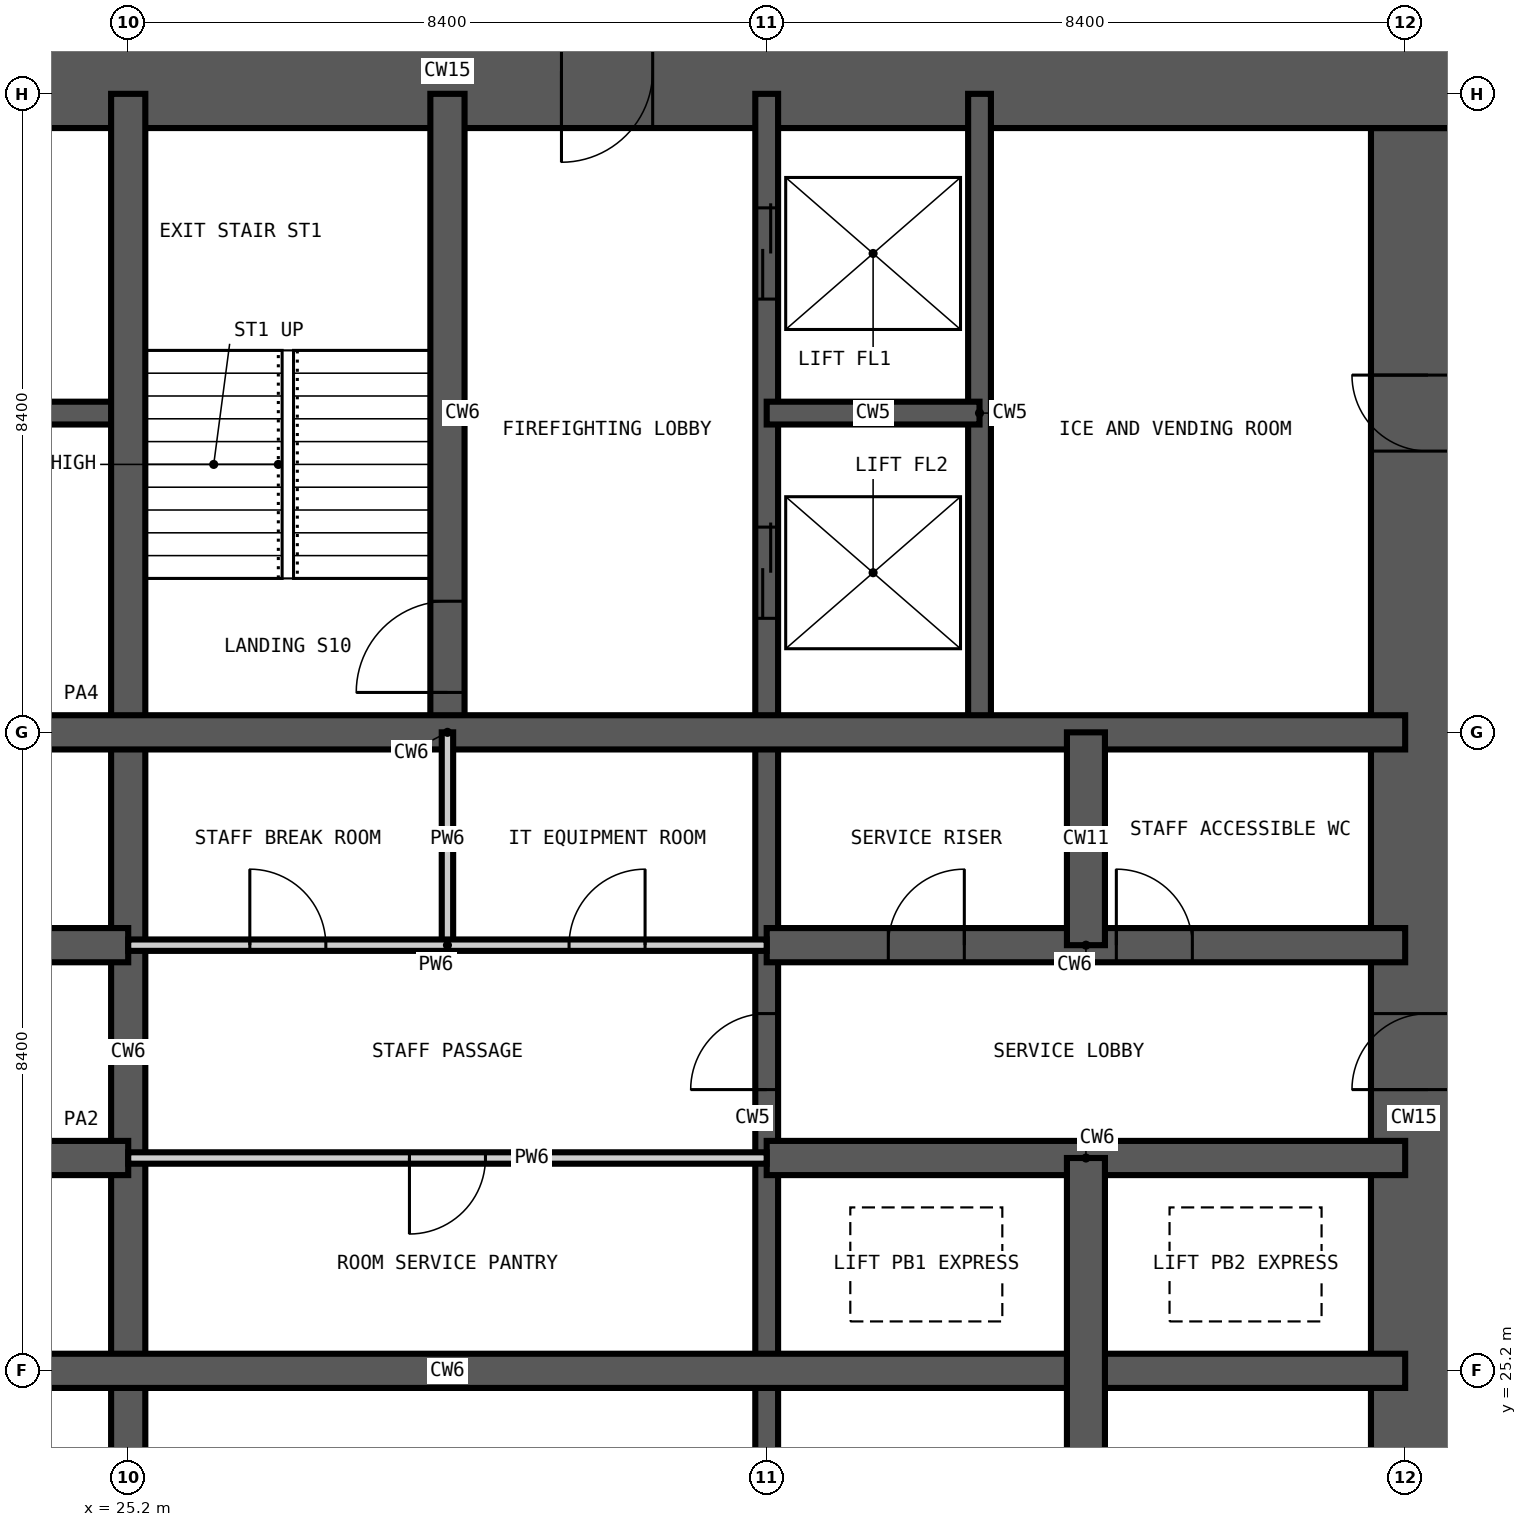
"""IFC4 building model, lengths in metres.
Left out: names, types, materials, properties, quantities, classifications, styles, units other than length and angle.
Written with IfcOpenShell. Run it as: python <this file> out.ifc"""

import sys

from ifc_helpers import new_model, si_unit, direction, frame, frame_2d, origin, place, context, subcontext, project, spatial, rectangle, extrude, element, fill, save


model = new_model("IFC4")
c1 = context("Model", 3, precision=1e-05, world=origin(), true_north=direction((0.0, 1.0)))
c2 = subcontext(c1, "Body", "Model", "MODEL_VIEW")
j1 = project(units=[si_unit("LENGTHUNIT", "METRE"), si_unit("PLANEANGLEUNIT", "RADIAN")], contexts=[c1])
p1 = place(None, origin())
s1 = spatial("IfcSite", under=j1, at=p1, CompositionType="ELEMENT")
p2 = place(p1, origin())
s2 = spatial("IfcBuilding", under=s1, at=p2, CompositionType="ELEMENT")
p3 = place(p2, frame((0.0, 0.0, 63.0)))
s3 = spatial("IfcBuildingStorey", under=s2, at=p3, CompositionType="ELEMENT", Elevation=63.0)
p4 = place(p3, frame((42.3, 17.25, -0.35), z_axis=(0.0, 0.0, 1.0), x_axis=(0.0, 1.0, 0.0)))
e1 = element("IfcWall", 1, at=p4, inside=s3, PredefinedType="SHEAR", context=c2, shape_type="SweptSolid", body=[
    extrude(rectangle(XDim=24.3, YDim=1.5, at=frame_2d((12.15, 0.0))), origin(), (0.0, 0.0, 1.0), 3.6),
])
p5 = place(p4, frame((0.35, 0.0, 0.35)))
e2 = element("IfcOpeningElement", 2, at=p5, cuts=e1, PredefinedType="OPENING", context=c2, shape_type="SweptSolid", body=[
    extrude(rectangle(XDim=1.2, YDim=2.2, at=frame_2d((0.6, 1.1))), frame((0.0, 0.76, 0.0), z_axis=(0.0, -1.0, 0.0), x_axis=(1.0, 0.0, 0.0)), (0.0, 0.0, 1.0), 1.52),
])
p6 = place(p4, frame((11.65, 0.0, 0.35)))
e3 = element("IfcOpeningElement", 3, at=p6, cuts=e1, PredefinedType="OPENING", context=c2, shape_type="SweptSolid", body=[
    extrude(rectangle(XDim=1.0, YDim=2.1, at=frame_2d((0.5, 1.05))), frame((0.0, 0.76, 0.0), z_axis=(0.0, -1.0, 0.0), x_axis=(1.0, 0.0, 0.0)), (0.0, 0.0, 1.0), 1.52),
])
p7 = place(p4, frame((20.05, 0.0, 0.35)))
e4 = element("IfcOpeningElement", 4, at=p7, cuts=e1, PredefinedType="OPENING", context=c2, shape_type="SweptSolid", body=[
    extrude(rectangle(XDim=1.0, YDim=2.1, at=frame_2d((0.5, 1.05))), frame((0.0, 0.76, 0.0), z_axis=(0.0, -1.0, 0.0), x_axis=(1.0, 0.0, 0.0)), (0.0, 0.0, 1.0), 1.52),
])
p8 = place(p3, frame((43.05, 42.3, -0.35), z_axis=(0.0, 0.0, 1.0), x_axis=(-1.0, 0.0, 0.0)))
e5 = element("IfcWall", 5, at=p8, inside=s3, PredefinedType="SHEAR", context=c2, shape_type="SweptSolid", body=[
    extrude(rectangle(XDim=27.3, YDim=1.5, at=frame_2d((13.65, 0.0))), origin(), (0.0, 0.0, 1.0), 3.6),
])
p9 = place(p8, frame((21.55, 0.0, 0.35)))
e6 = element("IfcOpeningElement", 6, at=p9, cuts=e5, PredefinedType="OPENING", context=c2, shape_type="SweptSolid", body=[
    extrude(rectangle(XDim=1.0, YDim=2.1, at=frame_2d((0.5, 1.05))), frame((0.0, 0.76, 0.0), z_axis=(0.0, -1.0, 0.0), x_axis=(1.0, 0.0, 0.0)), (0.0, 0.0, 1.0), 1.52),
])
p10 = place(p8, frame((10.95, 0.0, 0.35)))
e7 = element("IfcOpeningElement", 7, at=p10, cuts=e5, PredefinedType="OPENING", context=c2, shape_type="SweptSolid", body=[
    extrude(rectangle(XDim=1.2, YDim=2.2, at=frame_2d((0.6, 1.1))), frame((0.0, 0.76, 0.0), z_axis=(0.0, -1.0, 0.0), x_axis=(1.0, 0.0, 0.0)), (0.0, 0.0, 1.0), 1.52),
])
p11 = place(p3, frame((33.6, 16.8, -0.35), z_axis=(0.0, 0.0, 1.0), x_axis=(0.0, 1.0, 0.0)))
e8 = element("IfcWall", 8, at=p11, inside=s3, PredefinedType="SHEAR", context=c2, shape_type="SweptSolid", body=[
    extrude(rectangle(XDim=25.2, YDim=0.3, at=frame_2d((12.6, 0.0))), origin(), (0.0, 0.0, 1.0), 3.6),
])
p12 = place(p11, frame((22.5, 0.0, 0.35)))
e9 = element("IfcOpeningElement", 9, at=p12, cuts=e8, PredefinedType="OPENING", context=c2, shape_type="SweptSolid", body=[
    extrude(rectangle(XDim=1.2, YDim=2.2, at=frame_2d((0.6, 1.1))), frame((0.0, 0.16, 0.0), z_axis=(0.0, -1.0, 0.0), x_axis=(1.0, 0.0, 0.0)), (0.0, 0.0, 1.0), 0.32),
])
p13 = place(p11, frame((18.3, 0.0, 0.35)))
e10 = element("IfcOpeningElement", 10, at=p13, cuts=e8, PredefinedType="OPENING", context=c2, shape_type="SweptSolid", body=[
    extrude(rectangle(XDim=1.2, YDim=2.2, at=frame_2d((0.6, 1.1))), frame((0.0, 0.16, 0.0), z_axis=(0.0, -1.0, 0.0), x_axis=(1.0, 0.0, 0.0)), (0.0, 0.0, 1.0), 0.32),
])
p14 = place(p11, frame((12.1, 0.0, 0.35)))
e11 = element("IfcOpeningElement", 11, at=p14, cuts=e8, PredefinedType="OPENING", context=c2, shape_type="SweptSolid", body=[
    extrude(rectangle(XDim=1.0, YDim=2.1, at=frame_2d((0.5, 1.05))), frame((0.0, 0.16, 0.0), z_axis=(0.0, -1.0, 0.0), x_axis=(1.0, 0.0, 0.0)), (0.0, 0.0, 1.0), 0.32),
])
for number, where, z_axis, x_axis in (
    (12, (36.4, 33.6, -0.35), (0.0, 0.0, 1.0), (0.0, 1.0, 0.0)),
    (13, (16.8, 37.8, -0.35), (0.0, 0.0, 1.0), (1.0, 0.0, 0.0)),
):
    element("IfcWall", number, at=place(p3, frame(where, z_axis=z_axis, x_axis=x_axis)), inside=s3, PredefinedType="SHEAR", context=c2, shape_type="SweptSolid", body=[
        extrude(rectangle(XDim=8.4, YDim=0.3, at=frame_2d((4.2, 0.0))), origin(), (0.0, 0.0, 1.0), 3.6),
    ])
p15 = place(p3, frame((33.6, 37.8, -0.35), z_axis=(0.0, 0.0, 1.0), x_axis=(1.0, 0.0, 0.0)))
e14 = element("IfcWall", 14, at=p15, inside=s3, PredefinedType="SHEAR", context=c2, shape_type="SweptSolid", body=[
    extrude(rectangle(XDim=2.8, YDim=0.3, at=frame_2d((1.4, 0.0))), origin(), (0.0, 0.0, 1.0), 3.6),
])
p16 = place(p3, frame((25.2, 16.8, -0.35), z_axis=(0.0, 0.0, 1.0), x_axis=(0.0, 1.0, 0.0)))
e15 = element("IfcWall", 15, at=p16, inside=s3, PredefinedType="SHEAR", context=c2, shape_type="SweptSolid", body=[
    extrude(rectangle(XDim=25.2, YDim=0.45, at=frame_2d((12.6, 0.0))), origin(), (0.0, 0.0, 1.0), 3.6),
])
p17 = place(p3, frame((29.4, 33.6, -0.35), z_axis=(0.0, 0.0, 1.0), x_axis=(0.0, 1.0, 0.0)))
e16 = element("IfcWall", 16, at=p17, inside=s3, PredefinedType="SHEAR", context=c2, shape_type="SweptSolid", body=[
    extrude(rectangle(XDim=8.4, YDim=0.45, at=frame_2d((4.2, 0.0))), origin(), (0.0, 0.0, 1.0), 3.6),
])
p18 = place(p17, frame((0.525, 0.0, 0.35)))
e17 = element("IfcOpeningElement", 17, at=p18, cuts=e16, PredefinedType="OPENING", context=c2, shape_type="SweptSolid", body=[
    extrude(rectangle(XDim=1.2, YDim=2.2, at=frame_2d((0.6, 1.1))), frame((0.0, 0.235, 0.0), z_axis=(0.0, -1.0, 0.0), x_axis=(1.0, 0.0, 0.0)), (0.0, 0.0, 1.0), 0.47),
])
p19 = place(p3, frame((16.8, 25.2, -0.35), z_axis=(0.0, 0.0, 1.0), x_axis=(1.0, 0.0, 0.0)))
e18 = element("IfcWall", 18, at=p19, inside=s3, PredefinedType="SHEAR", context=c2, shape_type="SweptSolid", body=[
    extrude(rectangle(XDim=25.2, YDim=0.45, at=frame_2d((12.6, 0.0))), origin(), (0.0, 0.0, 1.0), 3.6),
])
p20 = place(p3, frame((16.8, 28.0, -0.35), z_axis=(0.0, 0.0, 1.0), x_axis=(1.0, 0.0, 0.0)))
e19 = element("IfcWall", 19, at=p20, inside=s3, PredefinedType="SHEAR", context=c2, shape_type="SweptSolid", body=[
    extrude(rectangle(XDim=8.4, YDim=0.45, at=frame_2d((4.2, 0.0))), origin(), (0.0, 0.0, 1.0), 3.6),
])
p21 = place(p20, frame((1.55, 0.0, 0.35)))
e20 = element("IfcOpeningElement", 20, at=p21, cuts=e19, PredefinedType="OPENING", context=c2, shape_type="SweptSolid", body=[
    extrude(rectangle(XDim=1.1, YDim=2.2, at=frame_2d((0.55, 1.1))), frame((0.0, 0.235, 0.0), z_axis=(0.0, -1.0, 0.0), x_axis=(1.0, 0.0, 0.0)), (0.0, 0.0, 1.0), 0.47),
])
p22 = place(p20, frame((5.75, 0.0, 0.35)))
e21 = element("IfcOpeningElement", 21, at=p22, cuts=e19, PredefinedType="OPENING", context=c2, shape_type="SweptSolid", body=[
    extrude(rectangle(XDim=1.1, YDim=2.2, at=frame_2d((0.55, 1.1))), frame((0.0, 0.235, 0.0), z_axis=(0.0, -1.0, 0.0), x_axis=(1.0, 0.0, 0.0)), (0.0, 0.0, 1.0), 0.47),
])
p23 = place(p3, frame((33.6, 28.0, -0.35), z_axis=(0.0, 0.0, 1.0), x_axis=(1.0, 0.0, 0.0)))
e22 = element("IfcWall", 22, at=p23, inside=s3, PredefinedType="SHEAR", context=c2, shape_type="SweptSolid", body=[
    extrude(rectangle(XDim=8.4, YDim=0.45, at=frame_2d((4.2, 0.0))), origin(), (0.0, 0.0, 1.0), 3.6),
])
p24 = place(p3, frame((16.8, 30.8, -0.35), z_axis=(0.0, 0.0, 1.0), x_axis=(1.0, 0.0, 0.0)))
e23 = element("IfcWall", 23, at=p24, inside=s3, PredefinedType="SHEAR", context=c2, shape_type="SweptSolid", body=[
    extrude(rectangle(XDim=8.4, YDim=0.45, at=frame_2d((4.2, 0.0))), origin(), (0.0, 0.0, 1.0), 3.6),
])
p25 = place(p24, frame((1.55, 0.0, 0.35)))
e24 = element("IfcOpeningElement", 24, at=p25, cuts=e23, PredefinedType="OPENING", context=c2, shape_type="SweptSolid", body=[
    extrude(rectangle(XDim=1.1, YDim=2.2, at=frame_2d((0.55, 1.1))), frame((0.0, 0.235, 0.0), z_axis=(0.0, -1.0, 0.0), x_axis=(1.0, 0.0, 0.0)), (0.0, 0.0, 1.0), 0.47),
])
p26 = place(p24, frame((5.75, 0.0, 0.35)))
e25 = element("IfcOpeningElement", 25, at=p26, cuts=e23, PredefinedType="OPENING", context=c2, shape_type="SweptSolid", body=[
    extrude(rectangle(XDim=1.1, YDim=2.2, at=frame_2d((0.55, 1.1))), frame((0.0, 0.235, 0.0), z_axis=(0.0, -1.0, 0.0), x_axis=(1.0, 0.0, 0.0)), (0.0, 0.0, 1.0), 0.47),
])
p27 = place(p3, frame((33.6, 30.8, -0.35), z_axis=(0.0, 0.0, 1.0), x_axis=(1.0, 0.0, 0.0)))
e26 = element("IfcWall", 26, at=p27, inside=s3, PredefinedType="SHEAR", context=c2, shape_type="SweptSolid", body=[
    extrude(rectangle(XDim=8.4, YDim=0.45, at=frame_2d((4.2, 0.0))), origin(), (0.0, 0.0, 1.0), 3.6),
])
p28 = place(p27, frame((1.6, 0.0, 0.35)))
e27 = element("IfcOpeningElement", 27, at=p28, cuts=e26, PredefinedType="OPENING", context=c2, shape_type="SweptSolid", body=[
    extrude(rectangle(XDim=1.0, YDim=2.1, at=frame_2d((0.5, 1.05))), frame((0.0, 0.235, 0.0), z_axis=(0.0, -1.0, 0.0), x_axis=(1.0, 0.0, 0.0)), (0.0, 0.0, 1.0), 0.47),
])
p29 = place(p27, frame((4.6, 0.0, 0.35)))
e28 = element("IfcOpeningElement", 28, at=p29, cuts=e26, PredefinedType="OPENING", context=c2, shape_type="SweptSolid", body=[
    extrude(rectangle(XDim=1.0, YDim=2.1, at=frame_2d((0.5, 1.05))), frame((0.0, 0.235, 0.0), z_axis=(0.0, -1.0, 0.0), x_axis=(1.0, 0.0, 0.0)), (0.0, 0.0, 1.0), 0.47),
])
p30 = place(p3, frame((16.8, 33.6, -0.35), z_axis=(0.0, 0.0, 1.0), x_axis=(1.0, 0.0, 0.0)))
e29 = element("IfcWall", 29, at=p30, inside=s3, PredefinedType="SHEAR", context=c2, shape_type="SweptSolid", body=[
    extrude(rectangle(XDim=25.2, YDim=0.45, at=frame_2d((12.6, 0.0))), origin(), (0.0, 0.0, 1.0), 3.6),
])
p31 = place(p3, frame((37.8, 16.8, -0.35), z_axis=(0.0, 0.0, 1.0), x_axis=(0.0, 1.0, 0.0)))
e30 = element("IfcWall", 30, at=p31, inside=s3, PredefinedType="SHEAR", context=c2, shape_type="SweptSolid", body=[
    extrude(rectangle(XDim=11.2, YDim=0.5, at=frame_2d((5.6, 0.0))), origin(), (0.0, 0.0, 1.0), 3.6),
])
p32 = place(p3, frame((37.8, 30.8, -0.35), z_axis=(0.0, 0.0, 1.0), x_axis=(0.0, 1.0, 0.0)))
e31 = element("IfcWall", 31, at=p32, inside=s3, PredefinedType="SHEAR", context=c2, shape_type="SweptSolid", body=[
    extrude(rectangle(XDim=2.8, YDim=0.5, at=frame_2d((1.4, 0.0))), origin(), (0.0, 0.0, 1.0), 3.6),
])
p33 = place(p3, frame((29.4, 30.8, 0.0), z_axis=(0.0, 0.0, 1.0), x_axis=(0.0, 1.0, 0.0)))
e32 = element("IfcWall", 32, at=p33, inside=s3, PredefinedType="PARTITIONING", context=c2, shape_type="SweptSolid", body=[
    extrude(rectangle(XDim=2.8, YDim=0.15, at=frame_2d((1.4, 0.0))), origin(), (0.0, 0.0, 1.0), 3.25),
])
p34 = place(p3, frame((25.2, 28.0, 0.0), z_axis=(0.0, 0.0, 1.0), x_axis=(1.0, 0.0, 0.0)))
e33 = element("IfcWall", 33, at=p34, inside=s3, PredefinedType="PARTITIONING", context=c2, shape_type="SweptSolid", body=[
    extrude(rectangle(XDim=8.4, YDim=0.15, at=frame_2d((4.2, 0.0))), origin(), (0.0, 0.0, 1.0), 3.25),
])
p35 = place(p34, frame((3.7, 0.0, 0.0)))
e34 = element("IfcOpeningElement", 34, at=p35, cuts=e33, PredefinedType="OPENING", context=c2, shape_type="SweptSolid", body=[
    extrude(rectangle(XDim=1.0, YDim=2.1, at=frame_2d((0.5, 1.05))), frame((0.0, 0.085, 0.0), z_axis=(0.0, -1.0, 0.0), x_axis=(1.0, 0.0, 0.0)), (0.0, 0.0, 1.0), 0.17),
])
p36 = place(p3, frame((25.2, 30.8, 0.0), z_axis=(0.0, 0.0, 1.0), x_axis=(1.0, 0.0, 0.0)))
e35 = element("IfcWall", 35, at=p36, inside=s3, PredefinedType="PARTITIONING", context=c2, shape_type="SweptSolid", body=[
    extrude(rectangle(XDim=8.4, YDim=0.15, at=frame_2d((4.2, 0.0))), origin(), (0.0, 0.0, 1.0), 3.25),
])
p37 = place(p36, frame((5.8, 0.0, 0.0)))
e36 = element("IfcOpeningElement", 36, at=p37, cuts=e35, PredefinedType="OPENING", context=c2, shape_type="SweptSolid", body=[
    extrude(rectangle(XDim=1.0, YDim=2.1, at=frame_2d((0.5, 1.05))), frame((0.0, 0.085, 0.0), z_axis=(0.0, -1.0, 0.0), x_axis=(1.0, 0.0, 0.0)), (0.0, 0.0, 1.0), 0.17),
])
p38 = place(p36, frame((1.6, 0.0, 0.0)))
e37 = element("IfcOpeningElement", 37, at=p38, cuts=e35, PredefinedType="OPENING", context=c2, shape_type="SweptSolid", body=[
    extrude(rectangle(XDim=1.0, YDim=2.1, at=frame_2d((0.5, 1.05))), frame((0.0, 0.085, 0.0), z_axis=(0.0, -1.0, 0.0), x_axis=(1.0, 0.0, 0.0)), (0.0, 0.0, 1.0), 0.17),
])
p39 = place(p18, origin())
e38 = element("IfcDoor", 38, at=p39, inside=s3, OperationType="SINGLE_SWING_LEFT", PredefinedType="DOOR", context=c2, shape_type="SweptSolid", body=[
    extrude(rectangle(XDim=1.2, YDim=2.2, at=frame_2d((0.6, 1.1))), frame((0.0, 0.025, 0.0), z_axis=(0.0, -1.0, 0.0), x_axis=(1.0, 0.0, 0.0)), (0.0, 0.0, 1.0), 0.05),
])
fill(e17, e38)
p40 = place(p12, origin())
e39 = element("IfcDoor", 39, at=p40, inside=s3, OperationType="DOUBLE_DOOR_SLIDING", PredefinedType="DOOR", context=c2, shape_type="SweptSolid", body=[
    extrude(rectangle(XDim=1.2, YDim=2.2, at=frame_2d((0.6, 1.1))), frame((0.0, 0.025, 0.0), z_axis=(0.0, -1.0, 0.0), x_axis=(1.0, 0.0, 0.0)), (0.0, 0.0, 1.0), 0.05),
])
fill(e9, e39)
p41 = place(p13, origin())
e40 = element("IfcDoor", 40, at=p41, inside=s3, OperationType="DOUBLE_DOOR_SLIDING", PredefinedType="DOOR", context=c2, shape_type="SweptSolid", body=[
    extrude(rectangle(XDim=1.2, YDim=2.2, at=frame_2d((0.6, 1.1))), frame((0.0, 0.025, 0.0), z_axis=(0.0, -1.0, 0.0), x_axis=(1.0, 0.0, 0.0)), (0.0, 0.0, 1.0), 0.05),
])
fill(e10, e40)
p42 = place(p14, origin())
e41 = element("IfcDoor", 41, at=p42, inside=s3, OperationType="SINGLE_SWING_LEFT", PredefinedType="DOOR", context=c2, shape_type="SweptSolid", body=[
    extrude(rectangle(XDim=1.0, YDim=2.1, at=frame_2d((0.5, 1.05))), frame((0.0, 0.025, 0.0), z_axis=(0.0, -1.0, 0.0), x_axis=(1.0, 0.0, 0.0)), (0.0, 0.0, 1.0), 0.05),
])
fill(e11, e41)
p43 = place(p35, frame((1.0, 0.0, 0.0), z_axis=(0.0, 0.0, 1.0), x_axis=(-1.0, 0.0, 0.0)))
e42 = element("IfcDoor", 42, at=p43, inside=s3, OperationType="SINGLE_SWING_RIGHT", PredefinedType="DOOR", context=c2, shape_type="SweptSolid", body=[
    extrude(rectangle(XDim=1.0, YDim=2.1, at=frame_2d((0.5, 1.05))), frame((0.0, 0.025, 0.0), z_axis=(0.0, -1.0, 0.0), x_axis=(1.0, 0.0, 0.0)), (0.0, 0.0, 1.0), 0.05),
])
fill(e34, e42)
p44 = place(p37, origin())
e43 = element("IfcDoor", 43, at=p44, inside=s3, OperationType="SINGLE_SWING_RIGHT", PredefinedType="DOOR", context=c2, shape_type="SweptSolid", body=[
    extrude(rectangle(XDim=1.0, YDim=2.1, at=frame_2d((0.5, 1.05))), frame((0.0, 0.025, 0.0), z_axis=(0.0, -1.0, 0.0), x_axis=(1.0, 0.0, 0.0)), (0.0, 0.0, 1.0), 0.05),
])
fill(e36, e43)
p45 = place(p38, origin())
e44 = element("IfcDoor", 44, at=p45, inside=s3, OperationType="SINGLE_SWING_LEFT", PredefinedType="DOOR", context=c2, shape_type="SweptSolid", body=[
    extrude(rectangle(XDim=1.0, YDim=2.1, at=frame_2d((0.5, 1.05))), frame((0.0, 0.025, 0.0), z_axis=(0.0, -1.0, 0.0), x_axis=(1.0, 0.0, 0.0)), (0.0, 0.0, 1.0), 0.05),
])
fill(e37, e44)
p46 = place(p28, origin())
e45 = element("IfcDoor", 45, at=p46, inside=s3, OperationType="SINGLE_SWING_RIGHT", PredefinedType="DOOR", context=c2, shape_type="SweptSolid", body=[
    extrude(rectangle(XDim=1.0, YDim=2.1, at=frame_2d((0.5, 1.05))), frame((0.0, 0.025, 0.0), z_axis=(0.0, -1.0, 0.0), x_axis=(1.0, 0.0, 0.0)), (0.0, 0.0, 1.0), 0.05),
])
fill(e27, e45)
p47 = place(p29, origin())
e46 = element("IfcDoor", 46, at=p47, inside=s3, OperationType="SINGLE_SWING_LEFT", PredefinedType="DOOR", context=c2, shape_type="SweptSolid", body=[
    extrude(rectangle(XDim=1.0, YDim=2.1, at=frame_2d((0.5, 1.05))), frame((0.0, 0.025, 0.0), z_axis=(0.0, -1.0, 0.0), x_axis=(1.0, 0.0, 0.0)), (0.0, 0.0, 1.0), 0.05),
])
fill(e28, e46)
p48 = place(p6, origin())
e47 = element("IfcDoor", 47, at=p48, inside=s3, OperationType="SINGLE_SWING_LEFT", PredefinedType="DOOR", context=c2, shape_type="SweptSolid", body=[
    extrude(rectangle(XDim=1.0, YDim=2.1, at=frame_2d((0.5, 1.05))), frame((0.0, 0.025, 0.0), z_axis=(0.0, -1.0, 0.0), x_axis=(1.0, 0.0, 0.0)), (0.0, 0.0, 1.0), 0.05),
])
fill(e3, e47)
p49 = place(p10, origin())
e48 = element("IfcDoor", 48, at=p49, inside=s3, OperationType="SINGLE_SWING_RIGHT", PredefinedType="DOOR", context=c2, shape_type="SweptSolid", body=[
    extrude(rectangle(XDim=1.2, YDim=2.2, at=frame_2d((0.6, 1.1))), frame((0.0, 0.025, 0.0), z_axis=(0.0, -1.0, 0.0), x_axis=(1.0, 0.0, 0.0)), (0.0, 0.0, 1.0), 0.05),
])
fill(e7, e48)
p50 = place(p7, origin())
e49 = element("IfcDoor", 49, at=p50, inside=s3, OperationType="SINGLE_SWING_RIGHT", PredefinedType="DOOR", context=c2, shape_type="SweptSolid", body=[
    extrude(rectangle(XDim=1.0, YDim=2.1, at=frame_2d((0.5, 1.05))), frame((0.0, 0.025, 0.0), z_axis=(0.0, -1.0, 0.0), x_axis=(1.0, 0.0, 0.0)), (0.0, 0.0, 1.0), 0.05),
])
fill(e4, e49)
save(model, sys.argv[1])
